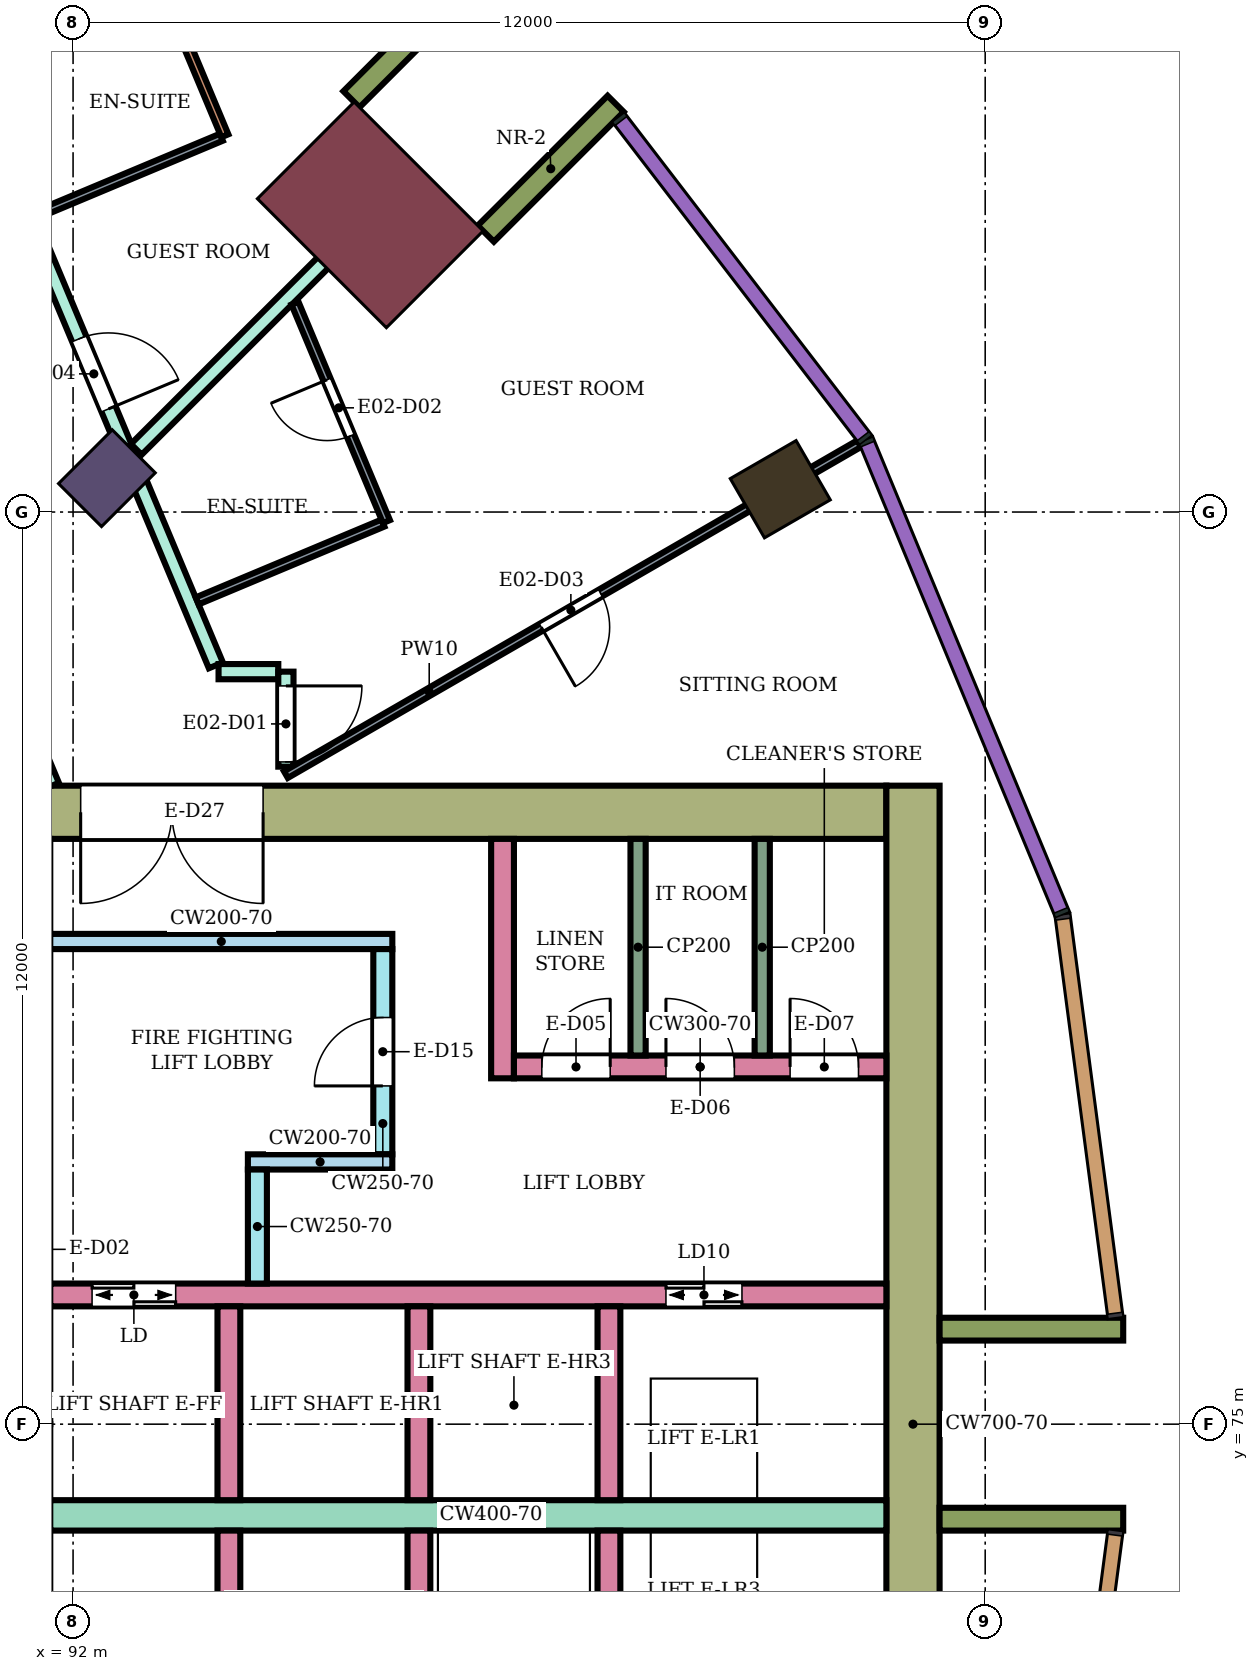
"""IFC4 building model, lengths in metres.
Left out: names, types, materials, properties, quantities, classifications, styles, units other than length and angle.
Written with IfcOpenShell. Run it as: python <this file> out.ifc"""

import sys

from ifc_helpers import new_model, si_unit, direction, frame, frame_2d, origin, origin_2d, place, context, subcontext, project, spatial, rectangle, extrude, element, fill, save


model = new_model("IFC4")
c1 = context("Model", 3, precision=1e-05, world=origin(), true_north=direction((0.0, 1.0)))
c2 = subcontext(c1, "Body", "Model", "MODEL_VIEW")
j1 = project(units=[si_unit("LENGTHUNIT", "METRE"), si_unit("PLANEANGLEUNIT", "RADIAN")], contexts=[c1])
p1 = place(None, origin())
s1 = spatial("IfcSite", under=j1, at=p1, CompositionType="ELEMENT")
p2 = place(p1, origin())
s2 = spatial("IfcBuilding", under=s1, at=p2, CompositionType="ELEMENT")
p3 = place(p2, frame((0.0, 0.0, 130.2)))
s3 = spatial("IfcBuildingStorey", under=s2, at=p3, CompositionType="ELEMENT", Elevation=130.2)
p4 = place(p3, frame((101.304, 87.3, 0.0), z_axis=(0.0, 0.0, 1.0), x_axis=(0.866025403784, 0.5, 0.0)))
e1 = element("IfcColumn", 1, at=p4, inside=s3, PredefinedType="COLUMN", context=c2, shape_type="SweptSolid", body=[
    extrude(rectangle(XDim=1.0, YDim=0.9, at=origin_2d()), origin(), (0.0, 0.0, 1.0), 3.9),
])
p5 = place(p3, frame((92.445, 87.445, 0.0), z_axis=(0.0, 0.0, 1.0), x_axis=(0.707106781187, 0.707106781187, 0.0)))
e2 = element("IfcColumn", 2, at=p5, inside=s3, PredefinedType="COLUMN", context=c2, shape_type="SweptSolid", body=[
    extrude(rectangle(XDim=1.0, YDim=0.8, at=origin_2d()), origin(), (0.0, 0.0, 1.0), 3.9),
])
p6 = place(p3, frame((95.91, 90.91, 0.0), z_axis=(0.0, 0.0, 1.0), x_axis=(0.707106781187, 0.707106781187, 0.0)))
e3 = element("IfcColumn", 3, at=p6, inside=s3, PredefinedType="COLUMN", context=c2, shape_type="SweptSolid", body=[
    extrude(rectangle(XDim=1.8, YDim=2.4, at=origin_2d()), origin(), (0.0, 0.0, 1.0), 3.9),
])
p7 = place(p3, frame((87.9, 83.05, 0.0), z_axis=(0.0, 0.0, 1.0), x_axis=(1.0, 0.0, 0.0)))
e4 = element("IfcWall", 4, at=p7, inside=s3, PredefinedType="SHEAR", context=c2, shape_type="SweptSolid", body=[
    extrude(rectangle(XDim=14.8, YDim=0.7, at=frame_2d((7.4, 0.0))), origin(), (0.0, 0.0, 1.0), 3.58),
])
p8 = place(p7, frame((4.2, 0.0, 0.0)))
e5 = element("IfcOpeningElement", 5, at=p8, cuts=e4, PredefinedType="OPENING", context=c2, shape_type="SweptSolid", body=[
    extrude(rectangle(XDim=2.4, YDim=2.4, at=frame_2d((1.2, 1.2))), frame((0.0, 0.36, 0.0), z_axis=(0.0, -1.0, 0.0), x_axis=(1.0, 0.0, 0.0)), (0.0, 0.0, 1.0), 0.72),
])
p9 = place(p3, frame((103.05, 66.6, 0.0), z_axis=(0.0, 0.0, 1.0), x_axis=(0.0, 1.0, 0.0)))
e6 = element("IfcWall", 6, at=p9, inside=s3, PredefinedType="SHEAR", context=c2, shape_type="SweptSolid", body=[
    extrude(rectangle(XDim=16.8, YDim=0.7, at=frame_2d((8.4, 0.0))), origin(), (0.0, 0.0, 1.0), 3.58),
])
p10 = place(p3, frame((91.7, 76.7, 0.0), z_axis=(0.0, 0.0, 1.0), x_axis=(1.0, 0.0, 0.0)))
e7 = element("IfcWall", 7, at=p10, inside=s3, PredefinedType="SHEAR", context=c2, shape_type="SweptSolid", body=[
    extrude(rectangle(XDim=11.0, YDim=0.3, at=frame_2d((5.5, 0.0))), origin(), (0.0, 0.0, 1.0), 3.58),
])
p11 = place(p10, frame((0.55, 0.0, 0.0)))
e8 = element("IfcOpeningElement", 8, at=p11, cuts=e7, PredefinedType="OPENING", context=c2, shape_type="SweptSolid", body=[
    extrude(rectangle(XDim=1.1, YDim=2.1, at=frame_2d((0.55, 1.05))), frame((0.0, 0.16, 0.0), z_axis=(0.0, -1.0, 0.0), x_axis=(1.0, 0.0, 0.0)), (0.0, 0.0, 1.0), 0.32),
])
p12 = place(p10, frame((8.1, 0.0, 0.0)))
e9 = element("IfcOpeningElement", 9, at=p12, cuts=e7, PredefinedType="OPENING", context=c2, shape_type="SweptSolid", body=[
    extrude(rectangle(XDim=1.0, YDim=2.1, at=frame_2d((0.5, 1.05))), frame((0.0, 0.16, 0.0), z_axis=(0.0, -1.0, 0.0), x_axis=(1.0, 0.0, 0.0)), (0.0, 0.0, 1.0), 0.32),
])
p13 = place(p3, frame((91.7, 73.8, 0.0), z_axis=(0.0, 0.0, 1.0), x_axis=(1.0, 0.0, 0.0)))
e10 = element("IfcWall", 10, at=p13, inside=s3, PredefinedType="SHEAR", context=c2, shape_type="SweptSolid", body=[
    extrude(rectangle(XDim=11.0, YDim=0.4, at=frame_2d((5.5, 0.0))), origin(), (0.0, 0.0, 1.0), 3.58),
])
for number, where, z_axis, x_axis in (
    (11, (94.05, 74.0, 0.0), (0.0, 0.0, 1.0), (0.0, 1.0, 0.0)),
    (12, (96.55, 74.0, 0.0), (0.0, 0.0, 1.0), (0.0, 1.0, 0.0)),
    (13, (99.05, 74.0, 0.0), (0.0, 0.0, 1.0), (0.0, 1.0, 0.0)),
    (14, (94.05, 71.05, 0.0), (0.0, 0.0, 1.0), (0.0, 1.0, 0.0)),
    (15, (96.55, 71.05, 0.0), (0.0, 0.0, 1.0), (0.0, 1.0, 0.0)),
    (16, (99.05, 71.05, 0.0), (0.0, 0.0, 1.0), (0.0, 1.0, 0.0)),
):
    element("IfcWall", number, at=place(p3, frame(where, z_axis=z_axis, x_axis=x_axis)), inside=s3, PredefinedType="SHEAR", context=c2, shape_type="SweptSolid", body=[
        extrude(rectangle(XDim=2.55, YDim=0.3, at=frame_2d((1.275, 0.0))), origin(), (0.0, 0.0, 1.0), 3.58),
    ])
p14 = place(p3, frame((91.7, 81.35, 0.0), z_axis=(0.0, 0.0, 1.0), x_axis=(1.0, 0.0, 0.0)))
e17 = element("IfcWall", 17, at=p14, inside=s3, PredefinedType="SHEAR", context=c2, shape_type="SweptSolid", body=[
    extrude(rectangle(XDim=4.5, YDim=0.2, at=frame_2d((2.25, 0.0))), origin(), (0.0, 0.0, 1.0), 3.58),
])
p15 = place(p3, frame((96.075, 78.55, 0.0), z_axis=(0.0, 0.0, 1.0), x_axis=(0.0, 1.0, 0.0)))
e18 = element("IfcWall", 18, at=p15, inside=s3, PredefinedType="SHEAR", context=c2, shape_type="SweptSolid", body=[
    extrude(rectangle(XDim=2.7, YDim=0.25, at=frame_2d((1.35, 0.0))), origin(), (0.0, 0.0, 1.0), 3.58),
])
p16 = place(p15, frame((0.9, 0.0, 0.0)))
e19 = element("IfcOpeningElement", 19, at=p16, cuts=e18, PredefinedType="OPENING", context=c2, shape_type="SweptSolid", body=[
    extrude(rectangle(XDim=0.9, YDim=2.1, at=frame_2d((0.45, 1.05))), frame((0.0, 0.135, 0.0), z_axis=(0.0, -1.0, 0.0), x_axis=(1.0, 0.0, 0.0)), (0.0, 0.0, 1.0), 0.27),
])
p17 = place(p3, frame((94.3, 78.45, 0.0), z_axis=(0.0, 0.0, 1.0), x_axis=(1.0, 0.0, 0.0)))
e20 = element("IfcWall", 20, at=p17, inside=s3, PredefinedType="SHEAR", context=c2, shape_type="SweptSolid", body=[
    extrude(rectangle(XDim=1.9, YDim=0.2, at=frame_2d((0.95, 0.0))), origin(), (0.0, 0.0, 1.0), 3.58),
])
p18 = place(p3, frame((94.425, 76.85, 0.0), z_axis=(0.0, 0.0, 1.0), x_axis=(0.0, 1.0, 0.0)))
e21 = element("IfcWall", 21, at=p18, inside=s3, PredefinedType="SHEAR", context=c2, shape_type="SweptSolid", body=[
    extrude(rectangle(XDim=1.5, YDim=0.25, at=frame_2d((0.75, 0.0))), origin(), (0.0, 0.0, 1.0), 3.58),
])
p19 = place(p3, frame((97.65, 79.55, 0.0), z_axis=(0.0, 0.0, 1.0), x_axis=(0.0, 1.0, 0.0)))
e22 = element("IfcWall", 22, at=p19, inside=s3, PredefinedType="SHEAR", context=c2, shape_type="SweptSolid", body=[
    extrude(rectangle(XDim=3.15, YDim=0.3, at=frame_2d((1.575, 0.0))), origin(), (0.0, 0.0, 1.0), 3.58),
])
p20 = place(p3, frame((97.8, 79.7, 0.0), z_axis=(0.0, 0.0, 1.0), x_axis=(1.0, 0.0, 0.0)))
e23 = element("IfcWall", 23, at=p20, inside=s3, PredefinedType="SHEAR", context=c2, shape_type="SweptSolid", body=[
    extrude(rectangle(XDim=4.9, YDim=0.3, at=frame_2d((2.45, 0.0))), origin(), (0.0, 0.0, 1.0), 3.58),
])
p21 = place(p20, frame((0.367, 0.0, 0.0)))
e24 = element("IfcOpeningElement", 24, at=p21, cuts=e23, PredefinedType="OPENING", context=c2, shape_type="SweptSolid", body=[
    extrude(rectangle(XDim=0.9, YDim=2.1, at=frame_2d((0.45, 1.05))), frame((0.0, 0.16, 0.0), z_axis=(0.0, -1.0, 0.0), x_axis=(1.0, 0.0, 0.0)), (0.0, 0.0, 1.0), 0.32),
])
p22 = place(p20, frame((2.0, 0.0, 0.0)))
e25 = element("IfcOpeningElement", 25, at=p22, cuts=e23, PredefinedType="OPENING", context=c2, shape_type="SweptSolid", body=[
    extrude(rectangle(XDim=0.9, YDim=2.1, at=frame_2d((0.45, 1.05))), frame((0.0, 0.16, 0.0), z_axis=(0.0, -1.0, 0.0), x_axis=(1.0, 0.0, 0.0)), (0.0, 0.0, 1.0), 0.32),
])
p23 = place(p20, frame((3.633, 0.0, 0.0)))
e26 = element("IfcOpeningElement", 26, at=p23, cuts=e23, PredefinedType="OPENING", context=c2, shape_type="SweptSolid", body=[
    extrude(rectangle(XDim=0.9, YDim=2.1, at=frame_2d((0.45, 1.05))), frame((0.0, 0.16, 0.0), z_axis=(0.0, -1.0, 0.0), x_axis=(1.0, 0.0, 0.0)), (0.0, 0.0, 1.0), 0.32),
])
for number, where, z_axis, x_axis in (
    (27, (103.4, 73.75, 0.0), (0.0, 0.0, 1.0), (1.0, 0.0, 0.0)),
    (28, (103.4, 76.25, 0.0), (0.0, 0.0, 1.0), (1.0, 0.0, 0.0)),
    (29, (97.43, 90.662, 0.0), (0.0, 0.0, 1.0), (0.707, 0.707, 0.0)),
    (30, (95.662, 92.43, 0.0), (0.0, 0.0, 1.0), (0.707, 0.707, 0.0)),
):
    element("IfcWall", number, at=place(p3, frame(where, z_axis=z_axis, x_axis=x_axis)), inside=s3, PredefinedType="NOTDEFINED", context=c2, shape_type="SweptSolid", body=[
        extrude(rectangle(XDim=2.416, YDim=0.3, at=frame_2d((1.208, 0.0))), origin(), (0.0, 0.0, 1.0), 3.9),
    ])
p24 = place(p3, frame((88.698, 90.624, 0.0), z_axis=(0.0, 0.0, 1.0), x_axis=(0.386027055918, -0.922487459047, 0.0)))
e31 = element("IfcWall", 31, at=p24, inside=s3, PredefinedType="PARTITIONING", context=c2, shape_type="SweptSolid", body=[
    extrude(rectangle(XDim=7.832, YDim=0.2, at=frame_2d((3.916, 0.0))), origin(), (0.0, 0.0, 1.0), 3.45),
])
p25 = place(p24, frame((1.482, 0.0, 0.0)))
e32 = element("IfcOpeningElement", 32, at=p25, cuts=e31, PredefinedType="OPENING", context=c2, shape_type="SweptSolid", body=[
    extrude(rectangle(XDim=1.0, YDim=2.1, at=frame_2d((0.5, 1.05))), frame((0.0, 0.11, 0.0), z_axis=(0.0, -1.0, 0.0), x_axis=(1.0, 0.0, 0.0)), (0.0, 0.0, 1.0), 0.22),
])
p26 = place(p3, frame((90.325, 92.88, 0.0), z_axis=(0.0, 0.0, 1.0), x_axis=(0.500084891114, 0.865976386329, 0.0)))
e33 = element("IfcWall", 33, at=p26, inside=s3, PredefinedType="PARTITIONING", context=c2, shape_type="SweptSolid", body=[
    extrude(rectangle(XDim=5.15, YDim=0.2, at=frame_2d((2.575, 0.0))), origin(), (0.0, 0.0, 1.0), 3.45),
])
p27 = place(p3, frame((90.604, 92.805, 0.0), z_axis=(0.0, 0.0, 1.0), x_axis=(0.386199042801, -0.922415470024, 0.0)))
e34 = element("IfcWall", 34, at=p27, inside=s3, PredefinedType="PARTITIONING", context=c2, shape_type="SweptSolid", body=[
    extrude(rectangle(XDim=8.48, YDim=0.2, at=frame_2d((4.24, 0.0))), origin(), (0.0, 0.0, 1.0), 3.45),
])
p28 = place(p27, frame((3.823, 0.0, 0.0)))
e35 = element("IfcOpeningElement", 35, at=p28, cuts=e34, PredefinedType="OPENING", context=c2, shape_type="SweptSolid", body=[
    extrude(rectangle(XDim=1.0, YDim=2.1, at=frame_2d((0.5, 1.05))), frame((0.0, 0.11, 0.0), z_axis=(0.0, -1.0, 0.0), x_axis=(1.0, 0.0, 0.0)), (0.0, 0.0, 1.0), 0.22),
])
p29 = place(p3, frame((92.832, 87.825, 0.0), z_axis=(0.0, 0.0, 1.0), x_axis=(0.707275688599, 0.706937833418, 0.0)))
e36 = element("IfcWall", 36, at=p29, inside=s3, PredefinedType="PARTITIONING", context=c2, shape_type="SweptSolid", body=[
    extrude(rectangle(XDim=5.058, YDim=0.2, at=frame_2d((2.529, 0.0))), origin(), (0.0, 0.0, 1.0), 3.45),
])
p30 = place(p3, frame((93.914, 84.9, 0.0), z_axis=(0.0, 0.0, 1.0), x_axis=(1.0, 0.0, 0.0)))
e37 = element("IfcWall", 37, at=p30, inside=s3, PredefinedType="PARTITIONING", context=c2, shape_type="SweptSolid", body=[
    extrude(rectangle(XDim=0.786, YDim=0.2, at=frame_2d((0.393, 0.0))), origin(), (0.0, 0.0, 1.0), 3.45),
])
p31 = place(p3, frame((94.8, 83.65, 0.0), z_axis=(0.0, 0.0, 1.0), x_axis=(0.0, 1.0, 0.0)))
e38 = element("IfcWall", 38, at=p31, inside=s3, PredefinedType="PARTITIONING", context=c2, shape_type="SweptSolid", body=[
    extrude(rectangle(XDim=1.25, YDim=0.2, at=frame_2d((0.625, 0.0))), origin(), (0.0, 0.0, 1.0), 3.45),
])
p32 = place(p31, frame((0.062, 0.0, 0.0)))
e39 = element("IfcOpeningElement", 39, at=p32, cuts=e38, PredefinedType="OPENING", context=c2, shape_type="SweptSolid", body=[
    extrude(rectangle(XDim=1.0, YDim=2.1, at=frame_2d((0.5, 1.05))), frame((0.0, 0.11, 0.0), z_axis=(0.0, -1.0, 0.0), x_axis=(1.0, 0.0, 0.0)), (0.0, 0.0, 1.0), 0.22),
])
p33 = place(p3, frame((91.507, 90.907, 0.0), z_axis=(0.0, 0.0, 1.0), x_axis=(0.922344808264, 0.38636777126, 0.0)))
e40 = element("IfcWall", 40, at=p33, inside=s3, PredefinedType="PARTITIONING", context=c2, shape_type="SweptSolid", body=[
    extrude(rectangle(XDim=2.65, YDim=0.1, at=frame_2d((1.325, 0.0))), origin(), (0.0, 0.0, 1.0), 3.45),
])
p34 = place(p3, frame((92.289, 96.03, 0.0), z_axis=(0.0, 0.0, 1.0), x_axis=(0.386237487323, -0.922399373041, 0.0)))
e41 = element("IfcWall", 41, at=p34, inside=s3, PredefinedType="PARTITIONING", context=c2, shape_type="SweptSolid", body=[
    extrude(rectangle(XDim=4.423, YDim=0.1, at=frame_2d((2.211, 0.0))), origin(), (0.0, 0.0, 1.0), 2.68),
])
p35 = place(p34, frame((1.731, 0.0, 0.0)))
e42 = element("IfcOpeningElement", 42, at=p35, cuts=e41, PredefinedType="OPENING", context=c2, shape_type="SweptSolid", body=[
    extrude(rectangle(XDim=0.8, YDim=2.1, at=frame_2d((0.4, 1.05))), frame((0.0, 0.06, 0.0), z_axis=(0.0, -1.0, 0.0), x_axis=(1.0, 0.0, 0.0)), (0.0, 0.0, 1.0), 0.12),
])
p36 = place(p3, frame((93.633, 85.831, 0.0), z_axis=(0.0, 0.0, 1.0), x_axis=(0.922344808264, 0.38636777126, 0.0)))
e43 = element("IfcWall", 43, at=p36, inside=s3, PredefinedType="PARTITIONING", context=c2, shape_type="SweptSolid", body=[
    extrude(rectangle(XDim=2.65, YDim=0.1, at=frame_2d((1.325, 0.0))), origin(), (0.0, 0.0, 1.0), 3.45),
])
p37 = place(p3, frame((94.8, 83.545, 0.0), z_axis=(0.0, 0.0, 1.0), x_axis=(0.86602264145, 0.500004784474, 0.0)))
e44 = element("IfcWall", 44, at=p37, inside=s3, PredefinedType="PARTITIONING", context=c2, shape_type="SweptSolid", body=[
    extrude(rectangle(XDim=8.708, YDim=0.1, at=frame_2d((4.354, 0.0))), origin(), (0.0, 0.0, 1.0), 3.45),
])
p38 = place(p37, frame((3.879, 0.0, 0.0)))
e45 = element("IfcOpeningElement", 45, at=p38, cuts=e44, PredefinedType="OPENING", context=c2, shape_type="SweptSolid", body=[
    extrude(rectangle(XDim=0.9, YDim=2.1, at=frame_2d((0.45, 1.05))), frame((0.0, 0.06, 0.0), z_axis=(0.0, -1.0, 0.0), x_axis=(1.0, 0.0, 0.0)), (0.0, 0.0, 1.0), 0.12),
])
p39 = place(p3, frame((94.919, 89.748, 0.0), z_axis=(0.0, 0.0, 1.0), x_axis=(0.386255913529, -0.922391657196, 0.0)))
e46 = element("IfcWall", 46, at=p39, inside=s3, PredefinedType="PARTITIONING", context=c2, shape_type="SweptSolid", body=[
    extrude(rectangle(XDim=3.116, YDim=0.1, at=frame_2d((1.558, 0.0))), origin(), (0.0, 0.0, 1.0), 3.45),
])
p40 = place(p39, frame((1.093, 0.0, 0.0)))
e47 = element("IfcOpeningElement", 47, at=p40, cuts=e46, PredefinedType="OPENING", context=c2, shape_type="SweptSolid", body=[
    extrude(rectangle(XDim=0.8, YDim=2.1, at=frame_2d((0.4, 1.05))), frame((0.0, 0.06, 0.0), z_axis=(0.0, -1.0, 0.0), x_axis=(1.0, 0.0, 0.0)), (0.0, 0.0, 1.0), 0.12),
])
for number, where, z_axis, x_axis in (
    (48, (99.433, 79.85, 0.0), (0.0, 0.0, 1.0), (0.0, 1.0, 0.0)),
    (49, (101.067, 79.85, 0.0), (0.0, 0.0, 1.0), (0.0, 1.0, 0.0)),
):
    element("IfcWall", number, at=place(p3, frame(where, z_axis=z_axis, x_axis=x_axis)), inside=s3, PredefinedType="PARTITIONING", context=c2, shape_type="SweptSolid", body=[
        extrude(rectangle(XDim=2.85, YDim=0.2, at=frame_2d((1.425, 0.0))), origin(), (0.0, 0.0, 1.0), 3.58),
    ])
p41 = place(p32, frame((1.0, 0.0, 0.0), z_axis=(0.0, 0.0, 1.0), x_axis=(-1.0, 0.0, 0.0)))
e50 = element("IfcDoor", 50, at=p41, inside=s3, OperationType="SINGLE_SWING_LEFT", PredefinedType="DOOR", context=c2, shape_type="SweptSolid", body=[
    extrude(rectangle(XDim=1.0, YDim=2.1, at=frame_2d((0.5, 1.05))), frame((0.0, 0.025, 0.0), z_axis=(0.0, -1.0, 0.0), x_axis=(1.0, 0.0, 0.0)), (0.0, 0.0, 1.0), 0.05),
])
fill(e39, e50)
p42 = place(p40, frame((0.8, 0.0, 0.0), z_axis=(0.0, 0.0, 1.0), x_axis=(-1.0, 0.0, 0.0)))
e51 = element("IfcDoor", 51, at=p42, inside=s3, OperationType="SINGLE_SWING_RIGHT", PredefinedType="DOOR", context=c2, shape_type="SweptSolid", body=[
    extrude(rectangle(XDim=0.8, YDim=2.1, at=frame_2d((0.4, 1.05))), frame((0.0, 0.025, 0.0), z_axis=(0.0, -1.0, 0.0), x_axis=(1.0, 0.0, 0.0)), (0.0, 0.0, 1.0), 0.05),
])
fill(e47, e51)
p43 = place(p38, frame((0.9, 0.0, 0.0), z_axis=(0.0, 0.0, 1.0), x_axis=(-1.0, 0.0, 0.0)))
e52 = element("IfcDoor", 52, at=p43, inside=s3, OperationType="SINGLE_SWING_RIGHT", PredefinedType="DOOR", context=c2, shape_type="SweptSolid", body=[
    extrude(rectangle(XDim=0.9, YDim=2.1, at=frame_2d((0.45, 1.05))), frame((0.0, 0.025, 0.0), z_axis=(0.0, -1.0, 0.0), x_axis=(1.0, 0.0, 0.0)), (0.0, 0.0, 1.0), 0.05),
])
fill(e45, e52)
p44 = place(p28, origin())
e53 = element("IfcDoor", 53, at=p44, inside=s3, OperationType="SINGLE_SWING_RIGHT", PredefinedType="DOOR", context=c2, shape_type="SweptSolid", body=[
    extrude(rectangle(XDim=1.0, YDim=2.1, at=frame_2d((0.5, 1.05))), frame((0.0, 0.025, 0.0), z_axis=(0.0, -1.0, 0.0), x_axis=(1.0, 0.0, 0.0)), (0.0, 0.0, 1.0), 0.05),
])
fill(e35, e53)
p45 = place(p11, origin())
e54 = element("IfcDoor", 54, at=p45, inside=s3, OperationType="DOUBLE_DOOR_SLIDING", PredefinedType="DOOR", context=c2, shape_type="SweptSolid", body=[
    extrude(rectangle(XDim=1.1, YDim=2.1, at=frame_2d((0.55, 1.05))), frame((0.0, 0.025, 0.0), z_axis=(0.0, -1.0, 0.0), x_axis=(1.0, 0.0, 0.0)), (0.0, 0.0, 1.0), 0.05),
])
fill(e8, e54)
p46 = place(p12, origin())
e55 = element("IfcDoor", 55, at=p46, inside=s3, OperationType="DOUBLE_DOOR_SLIDING", PredefinedType="DOOR", context=c2, shape_type="SweptSolid", body=[
    extrude(rectangle(XDim=1.0, YDim=2.1, at=frame_2d((0.5, 1.05))), frame((0.0, 0.025, 0.0), z_axis=(0.0, -1.0, 0.0), x_axis=(1.0, 0.0, 0.0)), (0.0, 0.0, 1.0), 0.05),
])
fill(e9, e55)
p47 = place(p16, origin())
e56 = element("IfcDoor", 56, at=p47, inside=s3, OperationType="SINGLE_SWING_LEFT", PredefinedType="DOOR", context=c2, shape_type="SweptSolid", body=[
    extrude(rectangle(XDim=0.9, YDim=2.1, at=frame_2d((0.45, 1.05))), frame((0.0, 0.025, 0.0), z_axis=(0.0, -1.0, 0.0), x_axis=(1.0, 0.0, 0.0)), (0.0, 0.0, 1.0), 0.05),
])
fill(e19, e56)
p48 = place(p21, origin())
e57 = element("IfcDoor", 57, at=p48, inside=s3, OperationType="SINGLE_SWING_RIGHT", PredefinedType="DOOR", context=c2, shape_type="SweptSolid", body=[
    extrude(rectangle(XDim=0.9, YDim=2.1, at=frame_2d((0.45, 1.05))), frame((0.0, 0.025, 0.0), z_axis=(0.0, -1.0, 0.0), x_axis=(1.0, 0.0, 0.0)), (0.0, 0.0, 1.0), 0.05),
])
fill(e24, e57)
p49 = place(p22, origin())
e58 = element("IfcDoor", 58, at=p49, inside=s3, OperationType="SINGLE_SWING_LEFT", PredefinedType="DOOR", context=c2, shape_type="SweptSolid", body=[
    extrude(rectangle(XDim=0.9, YDim=2.1, at=frame_2d((0.45, 1.05))), frame((0.0, 0.025, 0.0), z_axis=(0.0, -1.0, 0.0), x_axis=(1.0, 0.0, 0.0)), (0.0, 0.0, 1.0), 0.05),
])
fill(e25, e58)
p50 = place(p23, origin())
e59 = element("IfcDoor", 59, at=p50, inside=s3, OperationType="SINGLE_SWING_LEFT", PredefinedType="DOOR", context=c2, shape_type="SweptSolid", body=[
    extrude(rectangle(XDim=0.9, YDim=2.1, at=frame_2d((0.45, 1.05))), frame((0.0, 0.025, 0.0), z_axis=(0.0, -1.0, 0.0), x_axis=(1.0, 0.0, 0.0)), (0.0, 0.0, 1.0), 0.05),
])
fill(e26, e59)
p51 = place(p8, frame((2.4, 0.0, 0.0), z_axis=(0.0, 0.0, 1.0), x_axis=(-1.0, 0.0, 0.0)))
e60 = element("IfcDoor", 60, at=p51, inside=s3, OperationType="DOUBLE_DOOR_SINGLE_SWING", PredefinedType="DOOR", context=c2, shape_type="SweptSolid", body=[
    extrude(rectangle(XDim=2.4, YDim=2.4, at=frame_2d((1.2, 1.2))), frame((0.0, 0.025, 0.0), z_axis=(0.0, -1.0, 0.0), x_axis=(1.0, 0.0, 0.0)), (0.0, 0.0, 1.0), 0.05),
])
fill(e5, e60)
save(model, sys.argv[1])
